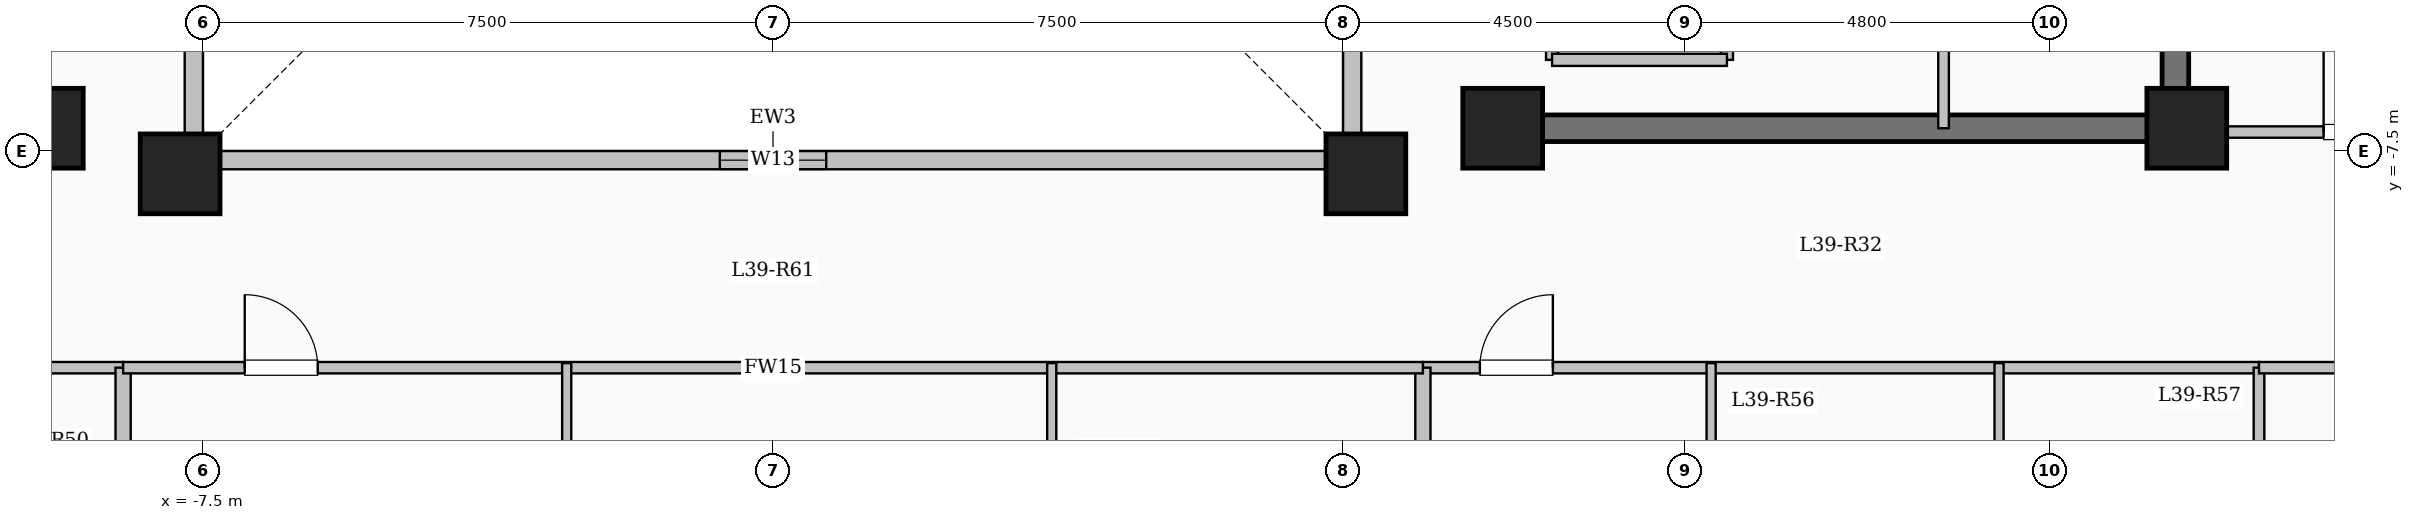
"""IFC4 building model, lengths in metres.
Left out: names, types, materials, properties, quantities, classifications, styles, units other than length and angle.
Written with IfcOpenShell. Run it as: python <this file> out.ifc"""

import sys

from ifc_helpers import new_model, si_unit, direction, frame, frame_2d, origin, origin_2d, place, context, subcontext, project, spatial, rectangle, extrude, element, fill, save


model = new_model("IFC4")
c1 = context("Model", 3, precision=1e-05, world=origin(), true_north=direction((0.0, 1.0)))
c2 = subcontext(c1, "Body", "Model", "MODEL_VIEW")
j1 = project(units=[si_unit("LENGTHUNIT", "METRE"), si_unit("PLANEANGLEUNIT", "RADIAN")], contexts=[c1])
p1 = place(None, origin())
s1 = spatial("IfcSite", under=j1, at=p1, CompositionType="ELEMENT")
p2 = place(p1, origin())
s2 = spatial("IfcBuilding", under=s1, at=p2, CompositionType="ELEMENT")
p3 = place(p2, frame((0.0, 0.0, 146.0)))
s3 = spatial("IfcBuildingStorey", under=s2, at=p3, CompositionType="ELEMENT", Elevation=146.0)
for number, where, z_axis, x_axis in (
    (1, (-7.8, -7.8, 0.0), (0.0, 0.0, 1.0), (1.0, 0.0, 0.0)),
    (2, (7.8, -7.8, 0.0), (0.0, 0.0, 1.0), (1.0, 0.0, 0.0)),
    (3, (-9.6, -7.2, 0.0), (0.0, 0.0, 1.0), (1.0, 0.0, 0.0)),
    (4, (9.6, -7.2, 0.0), (0.0, 0.0, 1.0), (1.0, 0.0, 0.0)),
    (5, (18.6, -7.2, 0.0), (0.0, 0.0, 1.0), (1.0, 0.0, 0.0)),
):
    element("IfcColumn", number, at=place(p3, frame(where, z_axis=z_axis, x_axis=x_axis)), inside=s3, PredefinedType="COLUMN", context=c2, shape_type="SweptSolid", body=[
        extrude(rectangle(XDim=1.05, YDim=1.05, at=origin_2d()), origin(), (0.0, 0.0, 1.0), 3.35),
    ])
p4 = place(p3, frame((-7.62, -7.62, 0.0), z_axis=(0.0, 0.0, 1.0), x_axis=(1.0, 0.0, 0.0)))
e6 = element("IfcWall", 6, at=p4, inside=s3, PredefinedType="SOLIDWALL", context=c2, shape_type="SweptSolid", body=[
    extrude(rectangle(XDim=15.24, YDim=0.24, at=frame_2d((7.62, 0.0))), origin(), (0.0, 0.0, 1.0), 3.1),
])
p5 = place(p4, frame((6.92, 0.0, 0.95)))
e7 = element("IfcOpeningElement", 7, at=p5, cuts=e6, PredefinedType="OPENING", context=c2, shape_type="SweptSolid", body=[
    extrude(rectangle(XDim=1.4, YDim=1.5, at=frame_2d((0.7, 0.75))), frame((0.0, 0.13, 0.0), z_axis=(0.0, -1.0, 0.0), x_axis=(1.0, 0.0, 0.0)), (0.0, 0.0, 1.0), 0.26),
])
p6 = place(p3, frame((7.62, -7.62, 0.0), z_axis=(0.0, 0.0, 1.0), x_axis=(0.0, 1.0, 0.0)))
e8 = element("IfcWall", 8, at=p6, inside=s3, PredefinedType="SOLIDWALL", context=c2, shape_type="SweptSolid", body=[
    extrude(rectangle(XDim=15.24, YDim=0.24, at=frame_2d((7.62, 0.0))), origin(), (0.0, 0.0, 1.0), 3.1),
])
p7 = place(p6, frame((6.92, 0.0, 0.95)))
e9 = element("IfcOpeningElement", 9, at=p7, cuts=e8, PredefinedType="OPENING", context=c2, shape_type="SweptSolid", body=[
    extrude(rectangle(XDim=1.4, YDim=1.5, at=frame_2d((0.7, 0.75))), frame((0.0, 0.13, 0.0), z_axis=(0.0, -1.0, 0.0), x_axis=(1.0, 0.0, 0.0)), (0.0, 0.0, 1.0), 0.26),
])
p8 = place(p3, frame((-7.62, 7.62, 0.0), z_axis=(0.0, 0.0, 1.0), x_axis=(0.0, -1.0, 0.0)))
e10 = element("IfcWall", 10, at=p8, inside=s3, PredefinedType="SOLIDWALL", context=c2, shape_type="SweptSolid", body=[
    extrude(rectangle(XDim=15.24, YDim=0.24, at=frame_2d((7.62, 0.0))), origin(), (0.0, 0.0, 1.0), 3.1),
])
p9 = place(p8, frame((6.92, 0.0, 0.95)))
e11 = element("IfcOpeningElement", 11, at=p9, cuts=e10, PredefinedType="OPENING", context=c2, shape_type="SweptSolid", body=[
    extrude(rectangle(XDim=1.4, YDim=1.5, at=frame_2d((0.7, 0.75))), frame((0.0, 0.13, 0.0), z_axis=(0.0, -1.0, 0.0), x_axis=(1.0, 0.0, 0.0)), (0.0, 0.0, 1.0), 0.26),
])
p10 = place(p3, frame((10.25, -6.3, 0.0), z_axis=(0.0, 0.0, 1.0), x_axis=(0.0, 1.0, 0.0)))
e12 = element("IfcWall", 12, at=p10, inside=s3, PredefinedType="SOLIDWALL", context=c2, shape_type="SweptSolid", body=[
    extrude(rectangle(XDim=2.6, YDim=0.16, at=frame_2d((1.3, 0.0))), origin(), (0.0, 0.0, 1.0), 3.1),
])
p11 = place(p10, frame((0.75, 0.0, 0.0)))
e13 = element("IfcOpeningElement", 13, at=p11, cuts=e12, PredefinedType="OPENING", context=c2, shape_type="SweptSolid", body=[
    extrude(rectangle(XDim=1.1, YDim=2.15, at=frame_2d((0.55, 1.075))), frame((0.0, 0.09, 0.0), z_axis=(0.0, -1.0, 0.0), x_axis=(1.0, 0.0, 0.0)), (0.0, 0.0, 1.0), 0.18),
])
p12 = place(p3, frame((12.55, -6.3, 0.0), z_axis=(0.0, 0.0, 1.0), x_axis=(0.0, 1.0, 0.0)))
e14 = element("IfcWall", 14, at=p12, inside=s3, PredefinedType="SOLIDWALL", context=c2, shape_type="SweptSolid", body=[
    extrude(rectangle(XDim=2.6, YDim=0.16, at=frame_2d((1.3, 0.0))), origin(), (0.0, 0.0, 1.0), 3.1),
])
p13 = place(p3, frame((10.25, -6.3, 0.0), z_axis=(0.0, 0.0, 1.0), x_axis=(1.0, 0.0, 0.0)))
e15 = element("IfcWall", 15, at=p13, inside=s3, PredefinedType="SOLIDWALL", context=c2, shape_type="SweptSolid", body=[
    extrude(rectangle(XDim=2.3, YDim=0.16, at=frame_2d((1.15, 0.0))), origin(), (0.0, 0.0, 1.0), 3.1),
])
p14 = place(p3, frame((18.45, -7.375, 0.0), z_axis=(0.0, 0.0, 1.0), x_axis=(0.0, 1.0, 0.0)))
e16 = element("IfcWall", 16, at=p14, inside=s3, PredefinedType="SHEAR", context=c2, shape_type="SweptSolid", body=[
    extrude(rectangle(XDim=14.05, YDim=0.35, at=frame_2d((7.025, 0.0))), origin(), (0.0, 0.0, 1.0), 3.35),
])
p15 = place(p3, frame((10.075, -7.2, 0.0), z_axis=(0.0, 0.0, 1.0), x_axis=(1.0, 0.0, 0.0)))
e17 = element("IfcWall", 17, at=p15, inside=s3, PredefinedType="SHEAR", context=c2, shape_type="SweptSolid", body=[
    extrude(rectangle(XDim=8.55, YDim=0.35, at=frame_2d((4.275, 0.0))), origin(), (0.0, 0.0, 1.0), 3.35),
])
p16 = place(p3, frame((15.4, -7.2, 0.0), z_axis=(0.0, 0.0, 1.0), x_axis=(0.0, 1.0, 0.0)))
e18 = element("IfcWall", 18, at=p16, inside=s3, PredefinedType="PARTITIONING", context=c2, shape_type="SweptSolid", body=[
    extrude(rectangle(XDim=10.45, YDim=0.14, at=frame_2d((5.225, 0.0))), origin(), (0.0, 0.0, 1.0), 3.1),
])
p17 = place(p16, frame((9.25, 0.0, 0.0)))
e19 = element("IfcOpeningElement", 19, at=p17, cuts=e18, PredefinedType="OPENING", context=c2, shape_type="SweptSolid", body=[
    extrude(rectangle(XDim=0.9, YDim=2.08, at=frame_2d((0.45, 1.04))), frame((0.0, 0.08, 0.0), z_axis=(0.0, -1.0, 0.0), x_axis=(1.0, 0.0, 0.0)), (0.0, 0.0, 1.0), 0.16),
])
p18 = place(p3, frame((-19.55, -10.35, 0.0), z_axis=(0.0, 0.0, 1.0), x_axis=(1.0, 0.0, 0.0)))
e20 = element("IfcWall", 20, at=p18, inside=s3, PredefinedType="PARTITIONING", context=c2, shape_type="SweptSolid", body=[
    extrude(rectangle(XDim=11.0, YDim=0.15, at=frame_2d((5.5, 0.0))), origin(), (0.0, 0.0, 1.0), 3.1),
])
p19 = place(p18, frame((0.7, 0.0, 0.0)))
e21 = element("IfcOpeningElement", 21, at=p19, cuts=e20, PredefinedType="OPENING", context=c2, shape_type="SweptSolid", body=[
    extrude(rectangle(XDim=0.96, YDim=2.15, at=frame_2d((0.48, 1.075))), frame((0.0, 0.085, 0.0), z_axis=(0.0, -1.0, 0.0), x_axis=(1.0, 0.0, 0.0)), (0.0, 0.0, 1.0), 0.17),
])
p20 = place(p3, frame((8.55, -10.35, 0.0), z_axis=(0.0, 0.0, 1.0), x_axis=(1.0, 0.0, 0.0)))
e22 = element("IfcWall", 22, at=p20, inside=s3, PredefinedType="PARTITIONING", context=c2, shape_type="SweptSolid", body=[
    extrude(rectangle(XDim=11.0, YDim=0.15, at=frame_2d((5.5, 0.0))), origin(), (0.0, 0.0, 1.0), 3.1),
])
p21 = place(p20, frame((0.75, 0.0, 0.0)))
e23 = element("IfcOpeningElement", 23, at=p21, cuts=e22, PredefinedType="OPENING", context=c2, shape_type="SweptSolid", body=[
    extrude(rectangle(XDim=0.96, YDim=2.15, at=frame_2d((0.48, 1.075))), frame((0.0, 0.085, 0.0), z_axis=(0.0, -1.0, 0.0), x_axis=(1.0, 0.0, 0.0)), (0.0, 0.0, 1.0), 0.17),
])
p22 = place(p3, frame((12.342, -21.2, 0.0), z_axis=(0.0, 0.0, 1.0), x_axis=(0.0, 1.0, 0.0)))
e24 = element("IfcWall", 24, at=p22, inside=s3, PredefinedType="PARTITIONING", context=c2, shape_type="SweptSolid", body=[
    extrude(rectangle(XDim=10.91, YDim=0.12, at=frame_2d((5.455, 0.0))), origin(), (0.0, 0.0, 1.0), 3.1),
])
p23 = place(p22, frame((7.085, 0.0, 0.0)))
e25 = element("IfcOpeningElement", 25, at=p23, cuts=e24, PredefinedType="OPENING", context=c2, shape_type="SweptSolid", body=[
    extrude(rectangle(XDim=1.08, YDim=2.15, at=frame_2d((0.54, 1.075))), frame((0.0, 0.07, 0.0), z_axis=(0.0, -1.0, 0.0), x_axis=(1.0, 0.0, 0.0)), (0.0, 0.0, 1.0), 0.14),
])
p24 = place(p3, frame((16.13, -12.75, 0.0), z_axis=(0.0, 0.0, 1.0), x_axis=(0.0, 1.0, 0.0)))
e26 = element("IfcWall", 26, at=p24, inside=s3, PredefinedType="PARTITIONING", context=c2, shape_type="SweptSolid", body=[
    extrude(rectangle(XDim=2.46, YDim=0.12, at=frame_2d((1.23, 0.0))), origin(), (0.0, 0.0, 1.0), 3.1),
])
for number, where, z_axis, x_axis in (
    (27, (-8.55, -21.804, 0.0), (0.0, 0.0, 1.0), (0.0, 1.0, 0.0)),
    (28, (8.55, -21.804, 0.0), (0.0, 0.0, 1.0), (0.0, 1.0, 0.0)),
):
    element("IfcWall", number, at=place(p3, frame(where, z_axis=z_axis, x_axis=x_axis)), inside=s3, PredefinedType="SOLIDWALL", context=c2, shape_type="SweptSolid", body=[
        extrude(rectangle(XDim=11.454, YDim=0.2, at=frame_2d((5.727, 0.0))), origin(), (0.0, 0.0, 1.0), 3.1),
    ])
p25 = place(p3, frame((-8.55, -10.35, 0.0), z_axis=(0.0, 0.0, 1.0), x_axis=(1.0, 0.0, 0.0)))
e29 = element("IfcWall", 29, at=p25, inside=s3, PredefinedType="PARTITIONING", context=c2, shape_type="SweptSolid", body=[
    extrude(rectangle(XDim=17.1, YDim=0.15, at=frame_2d((8.55, 0.0))), origin(), (0.0, 0.0, 1.0), 3.1),
])
p26 = place(p25, frame((1.6, 0.0, 0.0)))
e30 = element("IfcOpeningElement", 30, at=p26, cuts=e29, PredefinedType="OPENING", context=c2, shape_type="SweptSolid", body=[
    extrude(rectangle(XDim=0.96, YDim=2.15, at=frame_2d((0.48, 1.075))), frame((0.0, 0.085, 0.0), z_axis=(0.0, -1.0, 0.0), x_axis=(1.0, 0.0, 0.0)), (0.0, 0.0, 1.0), 0.17),
])
p27 = place(p3, frame((-2.714, -22.68, 0.0), z_axis=(0.0, 0.0, 1.0), x_axis=(0.0, 1.0, 0.0)))
e31 = element("IfcWall", 31, at=p27, inside=s3, PredefinedType="PARTITIONING", context=c2, shape_type="SweptSolid", body=[
    extrude(rectangle(XDim=12.39, YDim=0.12, at=frame_2d((6.195, 0.0))), origin(), (0.0, 0.0, 1.0), 3.1),
])
p28 = place(p27, frame((8.395, 0.0, 0.0)))
e32 = element("IfcOpeningElement", 32, at=p28, cuts=e31, PredefinedType="OPENING", context=c2, shape_type="SweptSolid", body=[
    extrude(rectangle(XDim=1.08, YDim=2.15, at=frame_2d((0.54, 1.075))), frame((0.0, 0.07, 0.0), z_axis=(0.0, -1.0, 0.0), x_axis=(1.0, 0.0, 0.0)), (0.0, 0.0, 1.0), 0.14),
])
p29 = place(p3, frame((3.667, -12.92, 0.0), z_axis=(0.0, 0.0, 1.0), x_axis=(0.0, 1.0, 0.0)))
e33 = element("IfcWall", 33, at=p29, inside=s3, PredefinedType="PARTITIONING", context=c2, shape_type="SweptSolid", body=[
    extrude(rectangle(XDim=2.63, YDim=0.12, at=frame_2d((1.315, 0.0))), origin(), (0.0, 0.0, 1.0), 3.1),
])
p30 = place(p3, frame((18.45, -7.25, 0.0), z_axis=(0.0, 0.0, 1.0), x_axis=(1.0, 0.0, 0.0)))
e34 = element("IfcWall", 34, at=p30, inside=s3, PredefinedType="PARTITIONING", context=c2, shape_type="SweptSolid", body=[
    extrude(rectangle(XDim=6.63, YDim=0.15, at=frame_2d((3.315, 0.0))), origin(), (0.0, 0.0, 1.0), 3.1),
])
p31 = place(p30, frame((1.95, 0.0, 0.0)))
e35 = element("IfcOpeningElement", 35, at=p31, cuts=e34, PredefinedType="OPENING", context=c2, shape_type="SweptSolid", body=[
    extrude(rectangle(XDim=1.08, YDim=2.15, at=frame_2d((0.54, 1.075))), frame((0.0, 0.085, 0.0), z_axis=(0.0, -1.0, 0.0), x_axis=(1.0, 0.0, 0.0)), (0.0, 0.0, 1.0), 0.17),
])
p32 = place(p3, frame((19.55, -17.25, 0.0), z_axis=(0.0, 0.0, 1.0), x_axis=(0.0, 1.0, 0.0)))
e36 = element("IfcWall", 36, at=p32, inside=s3, PredefinedType="PARTITIONING", context=c2, shape_type="SweptSolid", body=[
    extrude(rectangle(XDim=6.9, YDim=0.14, at=frame_2d((3.45, 0.0))), origin(), (0.0, 0.0, 1.0), 3.1),
])
p33 = place(p3, frame((19.55, -10.35, 0.0), z_axis=(0.0, 0.0, 1.0), x_axis=(1.0, 0.0, 0.0)))
e37 = element("IfcWall", 37, at=p33, inside=s3, PredefinedType="PARTITIONING", context=c2, shape_type="SweptSolid", body=[
    extrude(rectangle(XDim=5.53, YDim=0.15, at=frame_2d((2.765, 0.0))), origin(), (0.0, 0.0, 1.0), 3.1),
])
p34 = place(p33, frame((2.29, 0.0, 0.0)))
e38 = element("IfcOpeningElement", 38, at=p34, cuts=e37, PredefinedType="OPENING", context=c2, shape_type="SweptSolid", body=[
    extrude(rectangle(XDim=0.95, YDim=2.15, at=frame_2d((0.475, 1.075))), frame((0.0, 0.085, 0.0), z_axis=(0.0, -1.0, 0.0), x_axis=(1.0, 0.0, 0.0)), (0.0, 0.0, 1.0), 0.17),
])
p35 = place(p5, origin())
e39 = element("IfcWindow", 39, at=p35, inside=s3, PartitioningType="SINGLE_PANEL", PredefinedType="WINDOW", context=c2, shape_type="SweptSolid", body=[
    extrude(rectangle(XDim=1.4, YDim=1.5, at=frame_2d((0.7, 0.75))), frame((0.0, 0.03, 0.0), z_axis=(0.0, -1.0, 0.0), x_axis=(1.0, 0.0, 0.0)), (0.0, 0.0, 1.0), 0.06),
])
fill(e7, e39)
p36 = place(p21, origin())
e40 = element("IfcDoor", 40, at=p36, inside=s3, OperationType="SINGLE_SWING_RIGHT", PredefinedType="DOOR", context=c2, shape_type="SweptSolid", body=[
    extrude(rectangle(XDim=0.96, YDim=2.15, at=frame_2d((0.48, 1.075))), frame((0.0, 0.025, 0.0), z_axis=(0.0, -1.0, 0.0), x_axis=(1.0, 0.0, 0.0)), (0.0, 0.0, 1.0), 0.05),
])
fill(e23, e40)
p37 = place(p26, origin())
e41 = element("IfcDoor", 41, at=p37, inside=s3, OperationType="SINGLE_SWING_LEFT", PredefinedType="DOOR", context=c2, shape_type="SweptSolid", body=[
    extrude(rectangle(XDim=0.96, YDim=2.15, at=frame_2d((0.48, 1.075))), frame((0.0, 0.025, 0.0), z_axis=(0.0, -1.0, 0.0), x_axis=(1.0, 0.0, 0.0)), (0.0, 0.0, 1.0), 0.05),
])
fill(e30, e41)
p38 = place(p31, origin())
e42 = element("IfcDoor", 42, at=p38, inside=s3, OperationType="SINGLE_SWING_LEFT", PredefinedType="DOOR", context=c2, shape_type="SweptSolid", body=[
    extrude(rectangle(XDim=1.08, YDim=2.15, at=frame_2d((0.54, 1.075))), frame((0.0, 0.025, 0.0), z_axis=(0.0, -1.0, 0.0), x_axis=(1.0, 0.0, 0.0)), (0.0, 0.0, 1.0), 0.05),
])
fill(e35, e42)
save(model, sys.argv[1])
